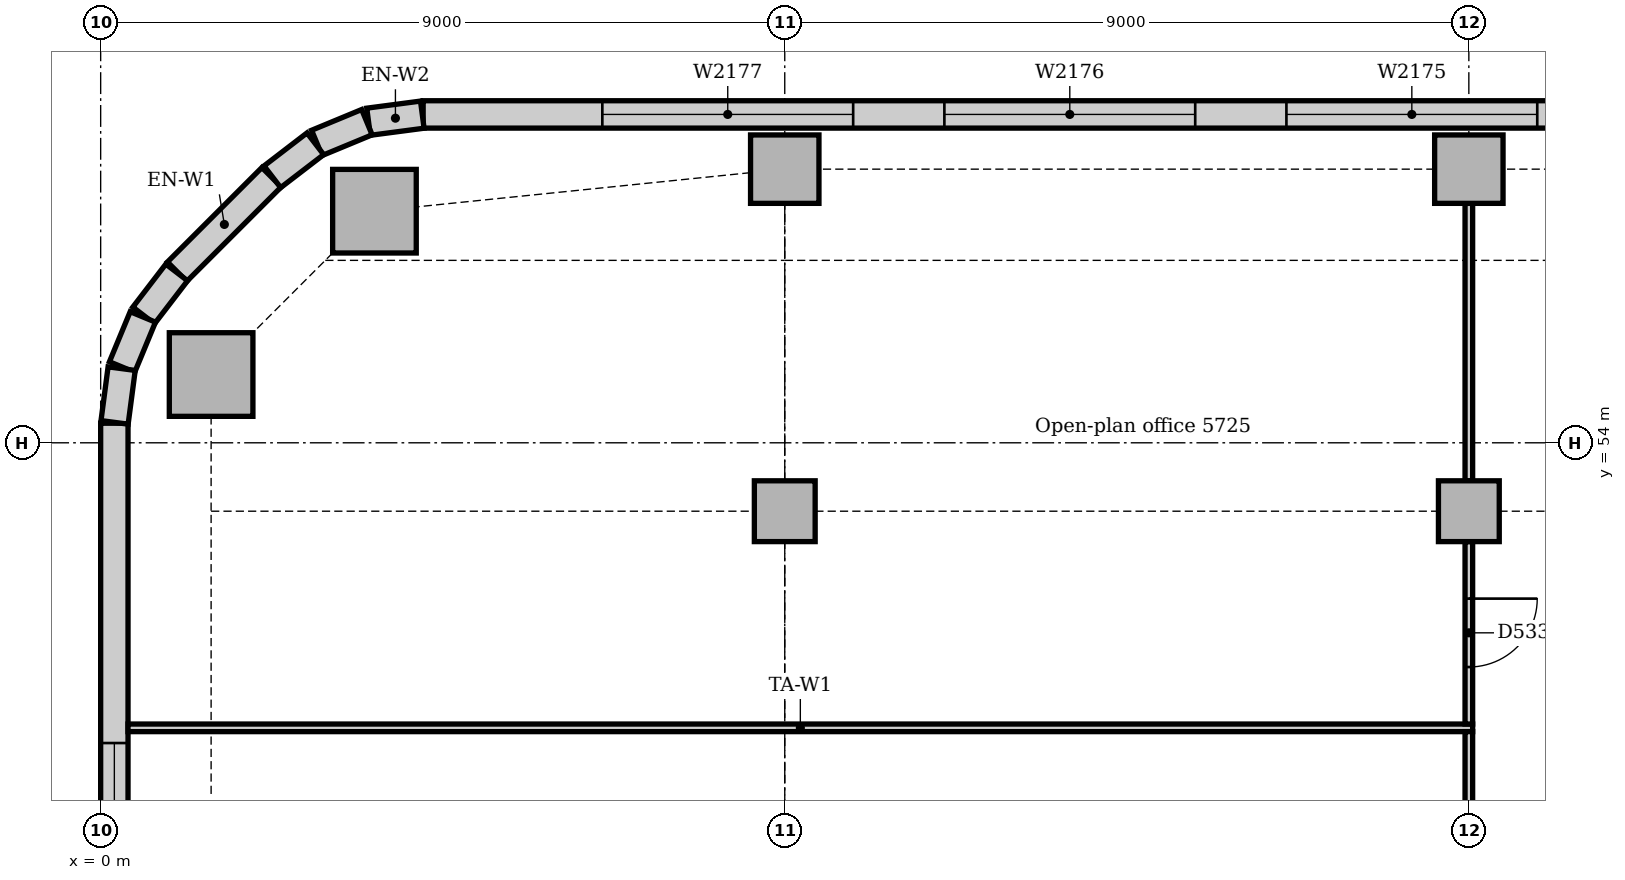
"""IFC4 building model, lengths in metres.
Left out: names, types, materials, properties, quantities, classifications, styles, units other than length and angle.
Written with IfcOpenShell. Run it as: python <this file> out.ifc"""

import sys

from ifc_helpers import new_model, si_unit, direction, frame, frame_2d, origin, origin_2d, place, context, subcontext, project, spatial, rectangle, extrude, element, fill, save


model = new_model("IFC4")
c1 = context("Model", 3, precision=1e-05, world=origin(), true_north=direction((0.0, 1.0)))
c2 = subcontext(c1, "Body", "Model", "MODEL_VIEW")
j1 = project(units=[si_unit("LENGTHUNIT", "METRE"), si_unit("PLANEANGLEUNIT", "RADIAN")], contexts=[c1])
p1 = place(None, origin())
s1 = spatial("IfcSite", under=j1, at=p1, CompositionType="ELEMENT")
p2 = place(p1, origin())
s2 = spatial("IfcBuilding", under=s1, at=p2, CompositionType="ELEMENT")
p3 = place(p2, frame((0.0, 0.0, 238.0)))
s3 = spatial("IfcBuildingStorey", under=s2, at=p3, CompositionType="ELEMENT", Elevation=238.0)
for number, where, z_axis, x_axis in (
    (1, (3.602, 57.047, 0.0), (0.0, 0.0, 1.0), (1.0, 0.0, 0.0)),
    (2, (1.453, 54.898, 0.0), (0.0, 0.0, 1.0), (1.0, 0.0, 0.0)),
):
    element("IfcColumn", number, at=place(p3, frame(where, z_axis=z_axis, x_axis=x_axis)), inside=s3, PredefinedType="COLUMN", context=c2, shape_type="SweptSolid", body=[
        extrude(rectangle(XDim=1.1, YDim=1.1, at=origin_2d()), origin(), (0.0, 0.0, 1.0), 3.7),
    ])
for number, where, z_axis, x_axis in (
    (3, (9.0, 57.6, 0.0), (0.0, 0.0, 1.0), (1.0, 0.0, 0.0)),
    (4, (18.0, 57.6, 0.0), (0.0, 0.0, 1.0), (1.0, 0.0, 0.0)),
):
    element("IfcColumn", number, at=place(p3, frame(where, z_axis=z_axis, x_axis=x_axis)), inside=s3, PredefinedType="COLUMN", context=c2, shape_type="SweptSolid", body=[
        extrude(rectangle(XDim=0.9, YDim=0.9, at=origin_2d()), origin(), (0.0, 0.0, 1.0), 3.7),
    ])
for number, where, z_axis, x_axis in (
    (5, (9.0, 53.1, 0.0), (0.0, 0.0, 1.0), (1.0, 0.0, 0.0)),
    (6, (18.0, 53.1, 0.0), (0.0, 0.0, 1.0), (1.0, 0.0, 0.0)),
):
    element("IfcColumn", number, at=place(p3, frame(where, z_axis=z_axis, x_axis=x_axis)), inside=s3, PredefinedType="COLUMN", context=c2, shape_type="SweptSolid", body=[
        extrude(rectangle(XDim=0.8, YDim=0.8, at=origin_2d()), origin(), (0.0, 0.0, 1.0), 3.7),
    ])
p4 = place(p3, frame((34.757, 58.32, 0.0), z_axis=(0.0, 0.0, 1.0), x_axis=(-1.0, 0.0, 0.0)))
e7 = element("IfcWall", 7, at=p4, inside=s3, PredefinedType="STANDARD", context=c2, shape_type="SweptSolid", body=[
    extrude(rectangle(XDim=30.515, YDim=0.36, at=frame_2d((15.257, 0.0))), origin(), (0.0, 0.0, 1.0), 3.7),
])
p5 = place(p4, frame((2.357, 0.0, 0.9)))
e8 = element("IfcOpeningElement", 8, at=p5, cuts=e7, PredefinedType="OPENING", context=c2, shape_type="SweptSolid", body=[
    extrude(rectangle(XDim=3.3, YDim=1.6, at=frame_2d((1.65, 0.8))), frame((0.0, 0.19, 0.0), z_axis=(0.0, -1.0, 0.0), x_axis=(1.0, 0.0, 0.0)), (0.0, 0.0, 1.0), 0.38),
])
p6 = place(p4, frame((6.857, 0.0, 0.9)))
e9 = element("IfcOpeningElement", 9, at=p6, cuts=e7, PredefinedType="OPENING", context=c2, shape_type="SweptSolid", body=[
    extrude(rectangle(XDim=3.3, YDim=1.6, at=frame_2d((1.65, 0.8))), frame((0.0, 0.19, 0.0), z_axis=(0.0, -1.0, 0.0), x_axis=(1.0, 0.0, 0.0)), (0.0, 0.0, 1.0), 0.38),
])
p7 = place(p4, frame((11.357, 0.0, 0.9)))
e10 = element("IfcOpeningElement", 10, at=p7, cuts=e7, PredefinedType="OPENING", context=c2, shape_type="SweptSolid", body=[
    extrude(rectangle(XDim=3.3, YDim=1.6, at=frame_2d((1.65, 0.8))), frame((0.0, 0.19, 0.0), z_axis=(0.0, -1.0, 0.0), x_axis=(1.0, 0.0, 0.0)), (0.0, 0.0, 1.0), 0.38),
])
p8 = place(p4, frame((15.857, 0.0, 0.9)))
e11 = element("IfcOpeningElement", 11, at=p8, cuts=e7, PredefinedType="OPENING", context=c2, shape_type="SweptSolid", body=[
    extrude(rectangle(XDim=3.3, YDim=1.6, at=frame_2d((1.65, 0.8))), frame((0.0, 0.19, 0.0), z_axis=(0.0, -1.0, 0.0), x_axis=(1.0, 0.0, 0.0)), (0.0, 0.0, 1.0), 0.38),
])
p9 = place(p4, frame((20.357, 0.0, 0.9)))
e12 = element("IfcOpeningElement", 12, at=p9, cuts=e7, PredefinedType="OPENING", context=c2, shape_type="SweptSolid", body=[
    extrude(rectangle(XDim=3.3, YDim=1.6, at=frame_2d((1.65, 0.8))), frame((0.0, 0.19, 0.0), z_axis=(0.0, -1.0, 0.0), x_axis=(1.0, 0.0, 0.0)), (0.0, 0.0, 1.0), 0.38),
])
p10 = place(p4, frame((24.857, 0.0, 0.9)))
e13 = element("IfcOpeningElement", 13, at=p10, cuts=e7, PredefinedType="OPENING", context=c2, shape_type="SweptSolid", body=[
    extrude(rectangle(XDim=3.3, YDim=1.6, at=frame_2d((1.65, 0.8))), frame((0.0, 0.19, 0.0), z_axis=(0.0, -1.0, 0.0), x_axis=(1.0, 0.0, 0.0)), (0.0, 0.0, 1.0), 0.38),
])
p11 = place(p3, frame((2.249, 57.494, 0.0), z_axis=(0.0, 0.0, 1.0), x_axis=(-0.707106781187, -0.707106781187, 0.0)))
e14 = element("IfcWall", 14, at=p11, inside=s3, PredefinedType="STANDARD", context=c2, shape_type="SweptSolid", body=[
    extrude(rectangle(XDim=1.757, YDim=0.36, at=frame_2d((0.879, 0.0))), origin(), (0.0, 0.0, 1.0), 3.7),
])
p12 = place(p3, frame((0.18, 54.257, 0.0), z_axis=(0.0, 0.0, 1.0), x_axis=(0.0, -1.0, 0.0)))
e15 = element("IfcWall", 15, at=p12, inside=s3, PredefinedType="STANDARD", context=c2, shape_type="SweptSolid", body=[
    extrude(rectangle(XDim=12.257, YDim=0.36, at=frame_2d((6.129, 0.0))), origin(), (0.0, 0.0, 1.0), 3.7),
])
p13 = place(p12, frame((4.207, 0.0, 0.9)))
e16 = element("IfcOpeningElement", 16, at=p13, cuts=e15, PredefinedType="OPENING", context=c2, shape_type="SweptSolid", body=[
    extrude(rectangle(XDim=1.8, YDim=1.6, at=frame_2d((0.9, 0.8))), frame((0.0, 0.19, 0.0), z_axis=(0.0, -1.0, 0.0), x_axis=(1.0, 0.0, 0.0)), (0.0, 0.0, 1.0), 0.38),
])
p14 = place(p12, frame((7.607, 0.0, 0.9)))
e17 = element("IfcOpeningElement", 17, at=p14, cuts=e15, PredefinedType="OPENING", context=c2, shape_type="SweptSolid", body=[
    extrude(rectangle(XDim=3.3, YDim=1.6, at=frame_2d((1.65, 0.8))), frame((0.0, 0.19, 0.0), z_axis=(0.0, -1.0, 0.0), x_axis=(1.0, 0.0, 0.0)), (0.0, 0.0, 1.0), 0.38),
])
for number, where, z_axis, x_axis in (
    (18, (4.231, 58.317, 0.0), (0.0, 0.0, 1.0), (-0.991, -0.131, 0.0)),
    (19, (3.503, 58.218, 0.0), (0.0, 0.0, 1.0), (-0.924, -0.383, 0.0)),
):
    element("IfcWall", number, at=place(p3, frame(where, z_axis=z_axis, x_axis=x_axis)), inside=s3, PredefinedType="STANDARD", context=c2, shape_type="SweptSolid", body=[
        extrude(rectangle(XDim=0.713, YDim=0.36, at=frame_2d((0.356, 0.0))), origin(), (0.0, 0.0, 1.0), 3.7),
    ])
for number, where, z_axis, x_axis in (
    (20, (2.825, 57.934, 0.0), (0.0, 0.0, 1.0), (-0.793, -0.609, 0.0)),
    (21, (1.0, 56.241, 0.0), (0.0, 0.0, 1.0), (-0.609, -0.793, 0.0)),
):
    element("IfcWall", number, at=place(p3, frame(where, z_axis=z_axis, x_axis=x_axis)), inside=s3, PredefinedType="STANDARD", context=c2, shape_type="SweptSolid", body=[
        extrude(rectangle(XDim=0.713, YDim=0.36, at=frame_2d((0.357, 0.0))), origin(), (0.0, 0.0, 1.0), 3.7),
    ])
for number, where, z_axis, x_axis in (
    (22, (0.555, 55.656, 0.0), (0.0, 0.0, 1.0), (-0.383, -0.924, 0.0)),
    (23, (0.276, 54.976, 0.0), (0.0, 0.0, 1.0), (-0.131, -0.991, 0.0)),
):
    element("IfcWall", number, at=place(p3, frame(where, z_axis=z_axis, x_axis=x_axis)), inside=s3, PredefinedType="STANDARD", context=c2, shape_type="SweptSolid", body=[
        extrude(rectangle(XDim=0.713, YDim=0.36, at=frame_2d((0.356, 0.0))), origin(), (0.0, 0.0, 1.0), 3.7),
    ])
p15 = place(p3, frame((0.36, 50.25, 0.0), z_axis=(0.0, 0.0, 1.0), x_axis=(1.0, 0.0, 0.0)))
e24 = element("IfcWall", 24, at=p15, inside=s3, PredefinedType="PARTITIONING", context=c2, shape_type="SweptSolid", body=[
    extrude(rectangle(XDim=17.69, YDim=0.1, at=frame_2d((8.845, 0.0))), origin(), (0.0, 0.0, 1.0), 3.7),
])
p16 = place(p3, frame((18.0, 50.3, 0.0), z_axis=(0.0, 0.0, 1.0), x_axis=(0.0, 1.0, 0.0)))
e25 = element("IfcWall", 25, at=p16, inside=s3, PredefinedType="PARTITIONING", context=c2, shape_type="SweptSolid", body=[
    extrude(rectangle(XDim=2.4, YDim=0.1, at=frame_2d((1.2, 0.0))), origin(), (0.0, 0.0, 1.0), 3.2),
])
p17 = place(p16, frame((0.75, 0.0, 0.0)))
e26 = element("IfcOpeningElement", 26, at=p17, cuts=e25, PredefinedType="OPENING", context=c2, shape_type="SweptSolid", body=[
    extrude(rectangle(XDim=0.9, YDim=2.1, at=frame_2d((0.45, 1.05))), frame((0.0, 0.06, 0.0), z_axis=(0.0, -1.0, 0.0), x_axis=(1.0, 0.0, 0.0)), (0.0, 0.0, 1.0), 0.12),
])
p18 = place(p3, frame((18.0, 44.5, 0.0), z_axis=(0.0, 0.0, 1.0), x_axis=(0.0, 1.0, 0.0)))
e27 = element("IfcWall", 27, at=p18, inside=s3, PredefinedType="PARTITIONING", context=c2, shape_type="SweptSolid", body=[
    extrude(rectangle(XDim=5.7, YDim=0.1, at=frame_2d((2.85, 0.0))), origin(), (0.0, 0.0, 1.0), 3.2),
])
p19 = place(p18, frame((2.4, 0.0, 0.0)))
e28 = element("IfcOpeningElement", 28, at=p19, cuts=e27, PredefinedType="OPENING", context=c2, shape_type="SweptSolid", body=[
    extrude(rectangle(XDim=0.9, YDim=2.1, at=frame_2d((0.45, 1.05))), frame((0.0, 0.06, 0.0), z_axis=(0.0, -1.0, 0.0), x_axis=(1.0, 0.0, 0.0)), (0.0, 0.0, 1.0), 0.12),
])
p20 = place(p3, frame((18.0, 53.5, 0.0), z_axis=(0.0, 0.0, 1.0), x_axis=(0.0, 1.0, 0.0)))
e29 = element("IfcWall", 29, at=p20, inside=s3, PredefinedType="PARTITIONING", context=c2, shape_type="SweptSolid", body=[
    extrude(rectangle(XDim=3.65, YDim=0.1, at=frame_2d((1.825, 0.0))), origin(), (0.0, 0.0, 1.0), 3.26),
])
p21 = place(p8, origin())
e30 = element("IfcWindow", 30, at=p21, inside=s3, PartitioningType="SINGLE_PANEL", PredefinedType="WINDOW", context=c2, shape_type="SweptSolid", body=[
    extrude(rectangle(XDim=3.3, YDim=1.6, at=frame_2d((1.65, 0.8))), frame((0.0, 0.13, 0.0), z_axis=(0.0, -1.0, 0.0), x_axis=(1.0, 0.0, 0.0)), (0.0, 0.0, 1.0), 0.06),
])
fill(e11, e30)
p22 = place(p9, origin())
e31 = element("IfcWindow", 31, at=p22, inside=s3, PartitioningType="SINGLE_PANEL", PredefinedType="WINDOW", context=c2, shape_type="SweptSolid", body=[
    extrude(rectangle(XDim=3.3, YDim=1.6, at=frame_2d((1.65, 0.8))), frame((0.0, 0.13, 0.0), z_axis=(0.0, -1.0, 0.0), x_axis=(1.0, 0.0, 0.0)), (0.0, 0.0, 1.0), 0.06),
])
fill(e12, e31)
p23 = place(p10, origin())
e32 = element("IfcWindow", 32, at=p23, inside=s3, PartitioningType="SINGLE_PANEL", PredefinedType="WINDOW", context=c2, shape_type="SweptSolid", body=[
    extrude(rectangle(XDim=3.3, YDim=1.6, at=frame_2d((1.65, 0.8))), frame((0.0, 0.13, 0.0), z_axis=(0.0, -1.0, 0.0), x_axis=(1.0, 0.0, 0.0)), (0.0, 0.0, 1.0), 0.06),
])
fill(e13, e32)
p24 = place(p13, origin())
e33 = element("IfcWindow", 33, at=p24, inside=s3, PartitioningType="SINGLE_PANEL", PredefinedType="WINDOW", context=c2, shape_type="SweptSolid", body=[
    extrude(rectangle(XDim=1.8, YDim=1.6, at=frame_2d((0.9, 0.8))), frame((0.0, 0.13, 0.0), z_axis=(0.0, -1.0, 0.0), x_axis=(1.0, 0.0, 0.0)), (0.0, 0.0, 1.0), 0.06),
])
fill(e16, e33)
p25 = place(p17, frame((0.9, 0.0, 0.0), z_axis=(0.0, 0.0, 1.0), x_axis=(-1.0, 0.0, 0.0)))
e34 = element("IfcDoor", 34, at=p25, inside=s3, OperationType="SINGLE_SWING_LEFT", PredefinedType="DOOR", context=c2, shape_type="SweptSolid", body=[
    extrude(rectangle(XDim=0.9, YDim=2.1, at=frame_2d((0.45, 1.05))), frame((0.0, 0.025, 0.0), z_axis=(0.0, -1.0, 0.0), x_axis=(1.0, 0.0, 0.0)), (0.0, 0.0, 1.0), 0.05),
])
fill(e26, e34)
save(model, sys.argv[1])
